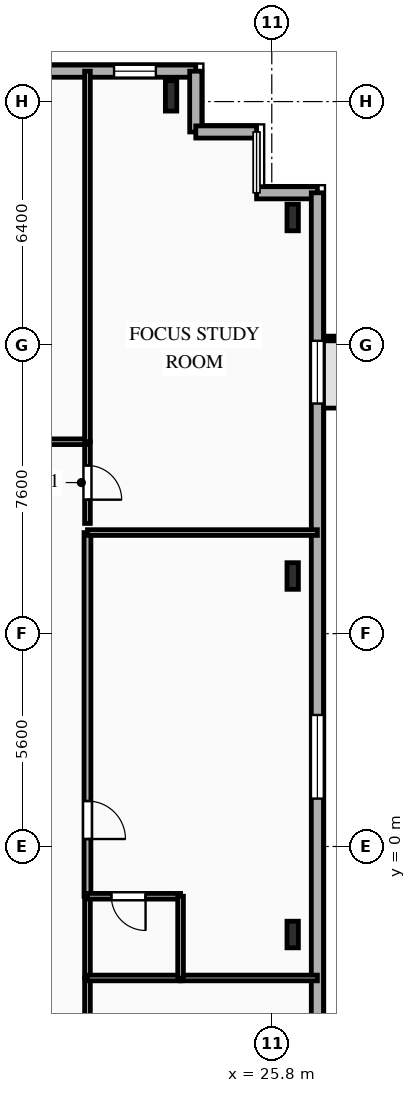
"""IFC4 building model, lengths in metres.
Left out: names, types, materials, properties, quantities, classifications, styles, units other than length and angle.
Written with IfcOpenShell. Run it as: python <this file> out.ifc"""

import sys

from ifc_helpers import new_model, si_unit, direction, frame, frame_2d, origin, origin_2d, place, context, subcontext, project, spatial, rectangle, i_section, extrude, element, fill, save


model = new_model("IFC4")
c1 = context("Model", 3, precision=1e-05, world=origin(), true_north=direction((0.0, 1.0)))
c2 = subcontext(c1, "Body", "Model", "MODEL_VIEW")
j1 = project(units=[si_unit("LENGTHUNIT", "METRE"), si_unit("PLANEANGLEUNIT", "RADIAN")], contexts=[c1])
p1 = place(None, origin())
s1 = spatial("IfcSite", under=j1, at=p1, CompositionType="ELEMENT")
p2 = place(p1, origin())
s2 = spatial("IfcBuilding", under=s1, at=p2, CompositionType="ELEMENT")
p3 = place(p2, frame((0.0, 0.0, 144.4)))
s3 = spatial("IfcBuildingStorey", under=s2, at=p3, CompositionType="ELEMENT", Elevation=144.4)
p4 = place(p3, frame((23.15, 19.75, 0.0), z_axis=(0.0, 0.0, 1.0), x_axis=(1.0, 0.0, 0.0)))
e1 = element("IfcColumn", 1, at=p4, inside=s3, PredefinedType="COLUMN", context=c2, shape_type="SweptSolid", body=[
    extrude(i_section(OverallWidth=0.3, OverallDepth=0.8, WebThickness=0.018, FlangeThickness=0.033, FilletRadius=0.03, at=origin_2d()), origin(), (0.0, 0.0, 1.0), 3.35),
])
for number, where, z_axis, x_axis in (
    (2, (26.35, -2.317, 0.0), (0.0, 0.0, 1.0), (1.0, 0.0, 0.0)),
    (3, (26.35, 7.117, 0.0), (0.0, 0.0, 1.0), (1.0, 0.0, 0.0)),
    (4, (26.35, 16.55, 0.0), (0.0, 0.0, 1.0), (1.0, 0.0, 0.0)),
):
    element("IfcColumn", number, at=place(p3, frame(where, z_axis=z_axis, x_axis=x_axis)), inside=s3, PredefinedType="COLUMN", context=c2, shape_type="SweptSolid", body=[
        extrude(i_section(OverallWidth=0.3, OverallDepth=0.7, WebThickness=0.017, FlangeThickness=0.032, FilletRadius=0.027, at=origin_2d()), origin(), (0.0, 0.0, 1.0), 3.35),
    ])
p5 = place(p3, frame((-25.8, 20.4, 0.0), z_axis=(0.0, 0.0, 1.0), x_axis=(1.0, 0.0, 0.0)))
e5 = element("IfcWall", 5, at=p5, inside=s3, PredefinedType="SOLIDWALL", context=c2, shape_type="SweptSolid", body=[
    extrude(rectangle(XDim=49.6, YDim=0.32, at=frame_2d((24.8, 0.0))), origin(), (0.0, 0.0, 1.0), 3.04),
])
p6 = place(p5, frame((2.135, 0.0, 0.85)))
e6 = element("IfcOpeningElement", 6, at=p6, cuts=e5, PredefinedType="OPENING", context=c2, shape_type="SweptSolid", body=[
    extrude(rectangle(XDim=1.65, YDim=1.85, at=frame_2d((0.825, 0.925))), frame((0.0, 0.17, 0.0), z_axis=(0.0, -1.0, 0.0), x_axis=(1.0, 0.0, 0.0)), (0.0, 0.0, 1.0), 0.34),
])
p7 = place(p5, frame((6.375, 0.0, 0.85)))
e7 = element("IfcOpeningElement", 7, at=p7, cuts=e5, PredefinedType="OPENING", context=c2, shape_type="SweptSolid", body=[
    extrude(rectangle(XDim=1.65, YDim=1.85, at=frame_2d((0.825, 0.925))), frame((0.0, 0.17, 0.0), z_axis=(0.0, -1.0, 0.0), x_axis=(1.0, 0.0, 0.0)), (0.0, 0.0, 1.0), 0.34),
])
p8 = place(p5, frame((12.53, 0.0, 0.85)))
e8 = element("IfcOpeningElement", 8, at=p8, cuts=e5, PredefinedType="OPENING", context=c2, shape_type="SweptSolid", body=[
    extrude(rectangle(XDim=1.5, YDim=1.85, at=frame_2d((0.75, 0.925))), frame((0.0, 0.17, 0.0), z_axis=(0.0, -1.0, 0.0), x_axis=(1.0, 0.0, 0.0)), (0.0, 0.0, 1.0), 0.34),
])
p9 = place(p5, frame((16.94, 0.0, 0.85)))
e9 = element("IfcOpeningElement", 9, at=p9, cuts=e5, PredefinedType="OPENING", context=c2, shape_type="SweptSolid", body=[
    extrude(rectangle(XDim=2.2, YDim=1.85, at=frame_2d((1.1, 0.925))), frame((0.0, 0.17, 0.0), z_axis=(0.0, -1.0, 0.0), x_axis=(1.0, 0.0, 0.0)), (0.0, 0.0, 1.0), 0.34),
])
p10 = place(p5, frame((21.54, 0.0, 0.85)))
e10 = element("IfcOpeningElement", 10, at=p10, cuts=e5, PredefinedType="OPENING", context=c2, shape_type="SweptSolid", body=[
    extrude(rectangle(XDim=2.2, YDim=1.85, at=frame_2d((1.1, 0.925))), frame((0.0, 0.17, 0.0), z_axis=(0.0, -1.0, 0.0), x_axis=(1.0, 0.0, 0.0)), (0.0, 0.0, 1.0), 0.34),
])
p11 = place(p5, frame((26.78, 0.0, 0.85)))
e11 = element("IfcOpeningElement", 11, at=p11, cuts=e5, PredefinedType="OPENING", context=c2, shape_type="SweptSolid", body=[
    extrude(rectangle(XDim=2.2, YDim=1.85, at=frame_2d((1.1, 0.925))), frame((0.0, 0.17, 0.0), z_axis=(0.0, -1.0, 0.0), x_axis=(1.0, 0.0, 0.0)), (0.0, 0.0, 1.0), 0.34),
])
p12 = place(p5, frame((33.132, 0.0, 0.85)))
e12 = element("IfcOpeningElement", 12, at=p12, cuts=e5, PredefinedType="OPENING", context=c2, shape_type="SweptSolid", body=[
    extrude(rectangle(XDim=2.2, YDim=1.85, at=frame_2d((1.1, 0.925))), frame((0.0, 0.17, 0.0), z_axis=(0.0, -1.0, 0.0), x_axis=(1.0, 0.0, 0.0)), (0.0, 0.0, 1.0), 0.34),
])
p13 = place(p5, frame((37.22, 0.0, 0.85)))
e13 = element("IfcOpeningElement", 13, at=p13, cuts=e5, PredefinedType="OPENING", context=c2, shape_type="SweptSolid", body=[
    extrude(rectangle(XDim=2.2, YDim=1.85, at=frame_2d((1.1, 0.925))), frame((0.0, 0.17, 0.0), z_axis=(0.0, -1.0, 0.0), x_axis=(1.0, 0.0, 0.0)), (0.0, 0.0, 1.0), 0.34),
])
p14 = place(p5, frame((43.055, 0.0, 0.85)))
e14 = element("IfcOpeningElement", 14, at=p14, cuts=e5, PredefinedType="OPENING", context=c2, shape_type="SweptSolid", body=[
    extrude(rectangle(XDim=1.65, YDim=1.85, at=frame_2d((0.825, 0.925))), frame((0.0, 0.17, 0.0), z_axis=(0.0, -1.0, 0.0), x_axis=(1.0, 0.0, 0.0)), (0.0, 0.0, 1.0), 0.34),
])
p15 = place(p5, frame((47.45, 0.0, 0.85)))
e15 = element("IfcOpeningElement", 15, at=p15, cuts=e5, PredefinedType="OPENING", context=c2, shape_type="SweptSolid", body=[
    extrude(rectangle(XDim=1.1, YDim=1.85, at=frame_2d((0.55, 0.925))), frame((0.0, 0.17, 0.0), z_axis=(0.0, -1.0, 0.0), x_axis=(1.0, 0.0, 0.0)), (0.0, 0.0, 1.0), 0.34),
])
for number, where, z_axis, x_axis in (
    (16, (23.8, 20.4, 0.0), (0.0, 0.0, 1.0), (0.0, -1.0, 0.0)),
    (17, (23.8, 18.8, 0.0), (0.0, 0.0, 1.0), (1.0, 0.0, 0.0)),
):
    element("IfcWall", number, at=place(p3, frame(where, z_axis=z_axis, x_axis=x_axis)), inside=s3, PredefinedType="SOLIDWALL", context=c2, shape_type="SweptSolid", body=[
        extrude(rectangle(XDim=1.6, YDim=0.32, at=frame_2d((0.8, 0.0))), origin(), (0.0, 0.0, 1.0), 3.04),
    ])
p16 = place(p3, frame((25.4, 17.2, 0.0), z_axis=(0.0, 0.0, 1.0), x_axis=(1.0, 0.0, 0.0)))
e18 = element("IfcWall", 18, at=p16, inside=s3, PredefinedType="SOLIDWALL", context=c2, shape_type="SweptSolid", body=[
    extrude(rectangle(XDim=1.6, YDim=0.32, at=frame_2d((0.8, 0.0))), origin(), (0.0, 0.0, 1.0), 3.04),
])
p17 = place(p3, frame((27.0, 17.2, 0.0), z_axis=(0.0, 0.0, 1.0), x_axis=(0.0, -1.0, 0.0)))
e19 = element("IfcWall", 19, at=p17, inside=s3, PredefinedType="SOLIDWALL", context=c2, shape_type="SweptSolid", body=[
    extrude(rectangle(XDim=29.6, YDim=0.32, at=frame_2d((14.8, 0.0))), origin(), (0.0, 0.0, 1.0), 3.04),
])
p18 = place(p17, frame((3.895, 0.0, 0.85)))
e20 = element("IfcOpeningElement", 20, at=p18, cuts=e19, PredefinedType="OPENING", context=c2, shape_type="SweptSolid", body=[
    extrude(rectangle(XDim=1.65, YDim=1.85, at=frame_2d((0.825, 0.925))), frame((0.0, 0.17, 0.0), z_axis=(0.0, -1.0, 0.0), x_axis=(1.0, 0.0, 0.0)), (0.0, 0.0, 1.0), 0.34),
])
p19 = place(p17, frame((13.74, 0.0, 0.85)))
e21 = element("IfcOpeningElement", 21, at=p19, cuts=e19, PredefinedType="OPENING", context=c2, shape_type="SweptSolid", body=[
    extrude(rectangle(XDim=2.2, YDim=1.85, at=frame_2d((1.1, 0.925))), frame((0.0, 0.17, 0.0), z_axis=(0.0, -1.0, 0.0), x_axis=(1.0, 0.0, 0.0)), (0.0, 0.0, 1.0), 0.34),
])
p20 = place(p17, frame((24.135, 0.0, 0.85)))
e22 = element("IfcOpeningElement", 22, at=p20, cuts=e19, PredefinedType="OPENING", context=c2, shape_type="SweptSolid", body=[
    extrude(rectangle(XDim=1.65, YDim=1.85, at=frame_2d((0.825, 0.925))), frame((0.0, 0.17, 0.0), z_axis=(0.0, -1.0, 0.0), x_axis=(1.0, 0.0, 0.0)), (0.0, 0.0, 1.0), 0.34),
])
p21 = place(p3, frame((20.95, 10.65, 0.0), z_axis=(0.0, 0.0, 1.0), x_axis=(0.0, -1.0, 0.0)))
e23 = element("IfcWall", 23, at=p21, inside=s3, PredefinedType="PARTITIONING", context=c2, shape_type="SweptSolid", body=[
    extrude(rectangle(XDim=2.15, YDim=0.15, at=frame_2d((1.075, 0.0))), origin(), (0.0, 0.0, 1.0), 3.04),
])
p22 = place(p21, frame((0.625, 0.0, 0.0)))
e24 = element("IfcOpeningElement", 24, at=p22, cuts=e23, PredefinedType="OPENING", context=c2, shape_type="SweptSolid", body=[
    extrude(rectangle(XDim=0.9, YDim=2.1, at=frame_2d((0.45, 1.05))), frame((0.0, 0.085, 0.0), z_axis=(0.0, -1.0, 0.0), x_axis=(1.0, 0.0, 0.0)), (0.0, 0.0, 1.0), 0.17),
])
p23 = place(p3, frame((15.113, 10.65, 0.0), z_axis=(0.0, 0.0, 1.0), x_axis=(1.0, 0.0, 0.0)))
e25 = element("IfcWall", 25, at=p23, inside=s3, PredefinedType="PARTITIONING", context=c2, shape_type="SweptSolid", body=[
    extrude(rectangle(XDim=5.837, YDim=0.15, at=frame_2d((2.918, 0.0))), origin(), (0.0, 0.0, 1.0), 3.04),
])
p24 = place(p23, frame((1.033, 0.0, 0.0)))
e26 = element("IfcOpeningElement", 26, at=p24, cuts=e25, PredefinedType="OPENING", context=c2, shape_type="SweptSolid", body=[
    extrude(rectangle(XDim=1.05, YDim=2.15, at=frame_2d((0.525, 1.075))), frame((0.0, 0.085, 0.0), z_axis=(0.0, -1.0, 0.0), x_axis=(1.0, 0.0, 0.0)), (0.0, 0.0, 1.0), 0.17),
])
p25 = place(p3, frame((20.95, -3.46, 0.0), z_axis=(0.0, 0.0, 1.0), x_axis=(0.0, -1.0, 0.0)))
e27 = element("IfcWall", 27, at=p25, inside=s3, PredefinedType="PARTITIONING", context=c2, shape_type="SweptSolid", body=[
    extrude(rectangle(XDim=2.14, YDim=0.15, at=frame_2d((1.07, 0.0))), origin(), (0.0, 0.0, 1.0), 3.04),
])
p26 = place(p3, frame((20.95, 8.26, 0.0), z_axis=(0.0, 0.0, 1.0), x_axis=(0.0, -1.0, 0.0)))
e28 = element("IfcWall", 28, at=p26, inside=s3, PredefinedType="PARTITIONING", context=c2, shape_type="SweptSolid", body=[
    extrude(rectangle(XDim=9.57, YDim=0.18, at=frame_2d((4.785, 0.0))), origin(), (0.0, 0.0, 1.0), 3.04),
])
p27 = place(p26, frame((7.064, 0.0, 0.0)))
e29 = element("IfcOpeningElement", 29, at=p27, cuts=e28, PredefinedType="OPENING", context=c2, shape_type="SweptSolid", body=[
    extrude(rectangle(XDim=1.0, YDim=2.15, at=frame_2d((0.5, 1.075))), frame((0.0, 0.1, 0.0), z_axis=(0.0, -1.0, 0.0), x_axis=(1.0, 0.0, 0.0)), (0.0, 0.0, 1.0), 0.2),
])
p28 = place(p3, frame((20.95, -1.31, 0.0), z_axis=(0.0, 0.0, 1.0), x_axis=(0.0, -1.0, 0.0)))
e30 = element("IfcWall", 30, at=p28, inside=s3, PredefinedType="PLUMBINGWALL", context=c2, shape_type="SweptSolid", body=[
    extrude(rectangle(XDim=2.15, YDim=0.15, at=frame_2d((1.075, 0.0))), origin(), (0.0, 0.0, 1.0), 3.04),
])
p29 = place(p3, frame((23.4, -3.46, 0.0), z_axis=(0.0, 0.0, 1.0), x_axis=(1.0, 0.0, 0.0)))
e31 = element("IfcWall", 31, at=p29, inside=s3, PredefinedType="PARTITIONING", context=c2, shape_type="SweptSolid", body=[
    extrude(rectangle(XDim=3.6, YDim=0.15, at=frame_2d((1.8, 0.0))), origin(), (0.0, 0.0, 1.0), 3.04),
])
p30 = place(p3, frame((20.95, -3.46, 0.0), z_axis=(0.0, 0.0, 1.0), x_axis=(1.0, 0.0, 0.0)))
e32 = element("IfcWall", 32, at=p30, inside=s3, PredefinedType="PLUMBINGWALL", context=c2, shape_type="SweptSolid", body=[
    extrude(rectangle(XDim=2.45, YDim=0.15, at=frame_2d((1.225, 0.0))), origin(), (0.0, 0.0, 1.0), 3.04),
])
p31 = place(p3, frame((23.4, -1.31, 0.0), z_axis=(0.0, 0.0, 1.0), x_axis=(-1.0, 0.0, 0.0)))
e33 = element("IfcWall", 33, at=p31, inside=s3, PredefinedType="PLUMBINGWALL", context=c2, shape_type="SweptSolid", body=[
    extrude(rectangle(XDim=2.45, YDim=0.15, at=frame_2d((1.225, 0.0))), origin(), (0.0, 0.0, 1.0), 3.04),
])
p32 = place(p31, frame((0.921, 0.0, 0.0)))
e34 = element("IfcOpeningElement", 34, at=p32, cuts=e33, PredefinedType="OPENING", context=c2, shape_type="SweptSolid", body=[
    extrude(rectangle(XDim=0.9, YDim=2.1, at=frame_2d((0.45, 1.05))), frame((0.0, 0.085, 0.0), z_axis=(0.0, -1.0, 0.0), x_axis=(1.0, 0.0, 0.0)), (0.0, 0.0, 1.0), 0.17),
])
p33 = place(p3, frame((23.4, -3.46, 0.0), z_axis=(0.0, 0.0, 1.0), x_axis=(0.0, 1.0, 0.0)))
e35 = element("IfcWall", 35, at=p33, inside=s3, PredefinedType="PLUMBINGWALL", context=c2, shape_type="SweptSolid", body=[
    extrude(rectangle(XDim=2.15, YDim=0.15, at=frame_2d((1.075, 0.0))), origin(), (0.0, 0.0, 1.0), 3.04),
])
p34 = place(p3, frame((20.95, 8.26, 0.0), z_axis=(0.0, 0.0, 1.0), x_axis=(1.0, 0.0, 0.0)))
e36 = element("IfcWall", 36, at=p34, inside=s3, PredefinedType="PARTITIONING", context=c2, shape_type="SweptSolid", body=[
    extrude(rectangle(XDim=6.05, YDim=0.15, at=frame_2d((3.025, 0.0))), origin(), (0.0, 0.0, 1.0), 3.04),
])
p35 = place(p3, frame((20.95, 10.65, 0.0), z_axis=(0.0, 0.0, 1.0), x_axis=(0.0, 1.0, 0.0)))
e37 = element("IfcWall", 37, at=p35, inside=s3, PredefinedType="PARTITIONING", context=c2, shape_type="SweptSolid", body=[
    extrude(rectangle(XDim=9.75, YDim=0.15, at=frame_2d((4.875, 0.0))), origin(), (0.0, 0.0, 1.0), 2.525),
])
p36 = place(p15, origin())
e38 = element("IfcWindow", 38, at=p36, inside=s3, PartitioningType="SINGLE_PANEL", PredefinedType="WINDOW", context=c2, shape_type="SweptSolid", body=[
    extrude(rectangle(XDim=1.1, YDim=1.85, at=frame_2d((0.55, 0.925))), frame((0.0, 0.03, 0.0), z_axis=(0.0, -1.0, 0.0), x_axis=(1.0, 0.0, 0.0)), (0.0, 0.0, 1.0), 0.06),
])
fill(e15, e38)
p37 = place(p18, origin())
e39 = element("IfcWindow", 39, at=p37, inside=s3, PartitioningType="SINGLE_PANEL", PredefinedType="WINDOW", context=c2, shape_type="SweptSolid", body=[
    extrude(rectangle(XDim=1.65, YDim=1.85, at=frame_2d((0.825, 0.925))), frame((0.0, 0.03, 0.0), z_axis=(0.0, -1.0, 0.0), x_axis=(1.0, 0.0, 0.0)), (0.0, 0.0, 1.0), 0.06),
])
fill(e20, e39)
p38 = place(p19, origin())
e40 = element("IfcWindow", 40, at=p38, inside=s3, PartitioningType="SINGLE_PANEL", PredefinedType="WINDOW", context=c2, shape_type="SweptSolid", body=[
    extrude(rectangle(XDim=2.2, YDim=1.85, at=frame_2d((1.1, 0.925))), frame((0.0, 0.03, 0.0), z_axis=(0.0, -1.0, 0.0), x_axis=(1.0, 0.0, 0.0)), (0.0, 0.0, 1.0), 0.06),
])
fill(e21, e40)
p39 = place(p22, origin())
e41 = element("IfcDoor", 41, at=p39, inside=s3, OperationType="SINGLE_SWING_RIGHT", PredefinedType="DOOR", context=c2, shape_type="SweptSolid", body=[
    extrude(rectangle(XDim=0.9, YDim=2.1, at=frame_2d((0.45, 1.05))), frame((0.0, 0.025, 0.0), z_axis=(0.0, -1.0, 0.0), x_axis=(1.0, 0.0, 0.0)), (0.0, 0.0, 1.0), 0.05),
])
fill(e24, e41)
p40 = place(p27, origin())
e42 = element("IfcDoor", 42, at=p40, inside=s3, OperationType="SINGLE_SWING_RIGHT", PredefinedType="DOOR", context=c2, shape_type="SweptSolid", body=[
    extrude(rectangle(XDim=1.0, YDim=2.15, at=frame_2d((0.5, 1.075))), frame((0.0, 0.025, 0.0), z_axis=(0.0, -1.0, 0.0), x_axis=(1.0, 0.0, 0.0)), (0.0, 0.0, 1.0), 0.05),
])
fill(e29, e42)
p41 = place(p32, origin())
e43 = element("IfcDoor", 43, at=p41, inside=s3, OperationType="SINGLE_SWING_LEFT", PredefinedType="DOOR", context=c2, shape_type="SweptSolid", body=[
    extrude(rectangle(XDim=0.9, YDim=2.1, at=frame_2d((0.45, 1.05))), frame((0.0, 0.025, 0.0), z_axis=(0.0, -1.0, 0.0), x_axis=(1.0, 0.0, 0.0)), (0.0, 0.0, 1.0), 0.05),
])
fill(e34, e43)
save(model, sys.argv[1])
